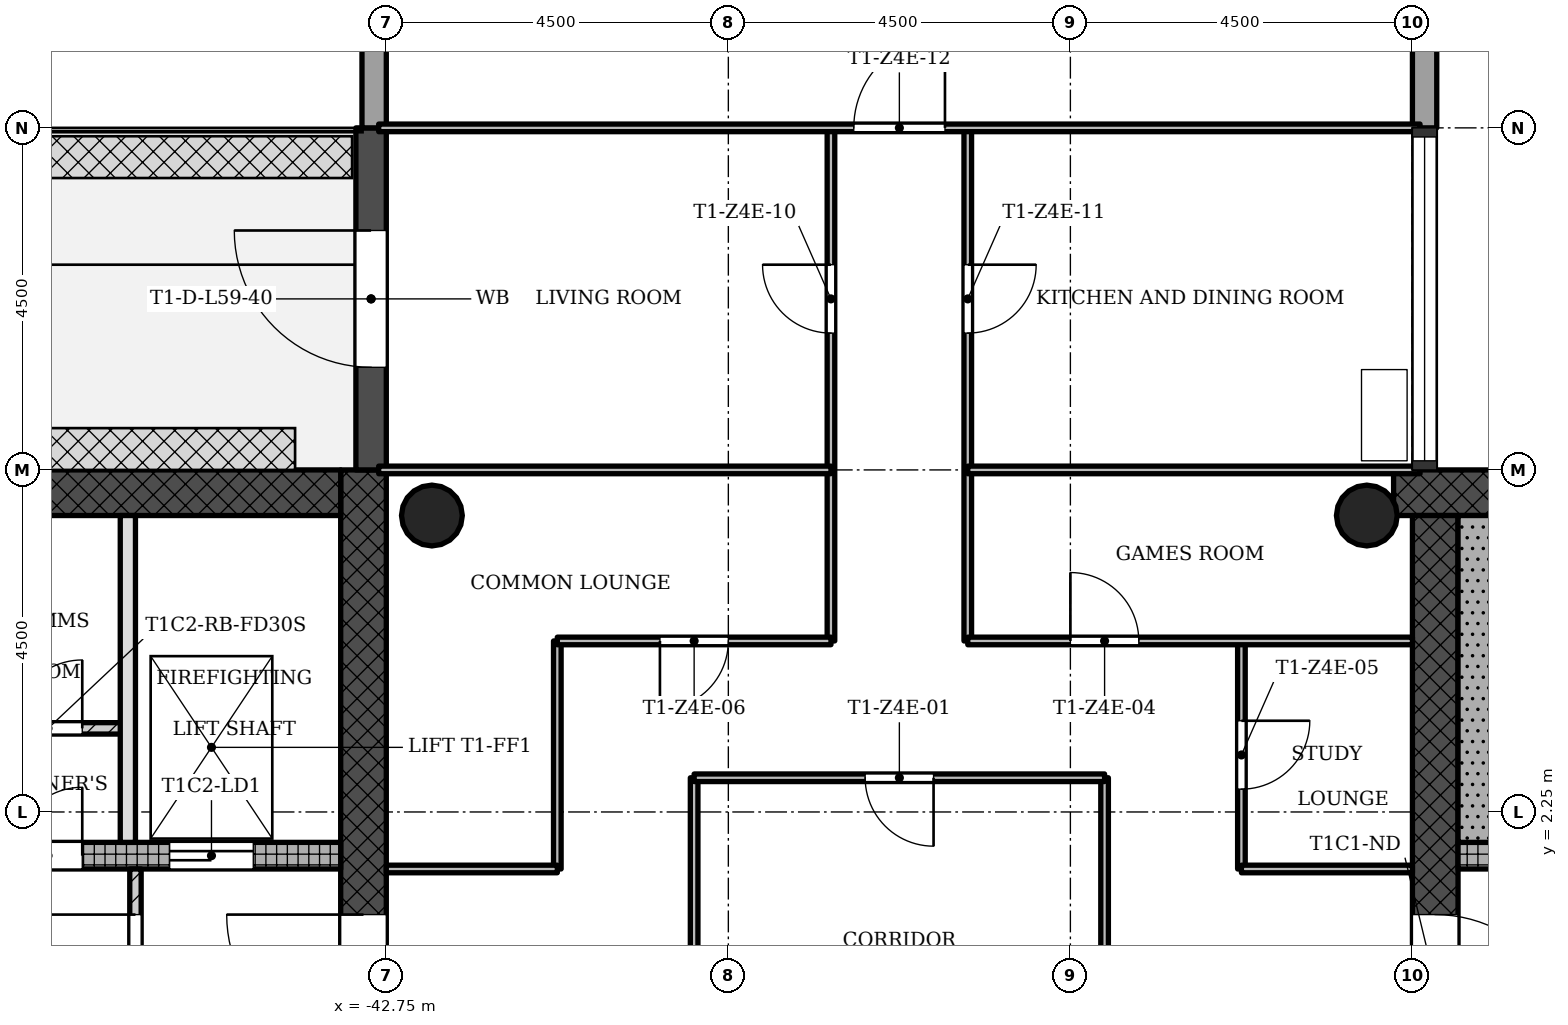
"""IFC4 building model, lengths in metres.
Left out: names, types, materials, properties, quantities, classifications, styles, units other than length and angle.
Written with IfcOpenShell. Run it as: python <this file> out.ifc"""

import sys

from ifc_helpers import new_model, si_unit, direction, frame, frame_2d, origin, origin_2d, place, context, subcontext, project, spatial, rectangle, hollow_circle, extrude, element, fill, save


model = new_model("IFC4")
c1 = context("Model", 3, precision=1e-05, world=origin(), true_north=direction((0.0, 1.0)))
c2 = subcontext(c1, "Body", "Model", "MODEL_VIEW")
j1 = project(units=[si_unit("LENGTHUNIT", "METRE"), si_unit("PLANEANGLEUNIT", "RADIAN")], contexts=[c1])
p1 = place(None, origin())
s1 = spatial("IfcSite", under=j1, at=p1, CompositionType="ELEMENT")
p2 = place(p1, origin())
s2 = spatial("IfcBuilding", under=s1, at=p2, CompositionType="ELEMENT")
p3 = place(p2, frame((0.0, 0.0, 213.0)))
s3 = spatial("IfcBuildingStorey", under=s2, at=p3, CompositionType="ELEMENT", Elevation=213.0)
p4 = place(p3, frame((-20.602, 6.45, 0.0), z_axis=(0.0, 0.0, 1.0), x_axis=(-1.0, 0.0, 0.0)))
e1 = element("IfcWall", 1, at=p4, inside=s3, PredefinedType="SHEAR", context=c2, shape_type="SweptSolid", body=[
    extrude(rectangle(XDim=8.896, YDim=0.6, at=frame_2d((4.448, 0.0))), origin(), (0.0, 0.0, 1.0), 3.4),
])
p5 = place(p3, frame((-28.95, 6.15, 0.0), z_axis=(0.0, 0.0, 1.0), x_axis=(0.0, -1.0, 0.0)))
e2 = element("IfcWall", 2, at=p5, inside=s3, PredefinedType="SHEAR", context=c2, shape_type="SweptSolid", body=[
    extrude(rectangle(XDim=12.9, YDim=0.6, at=frame_2d((6.45, 0.0))), origin(), (0.0, 0.0, 1.0), 3.4),
])
p6 = place(p5, frame((5.25, 0.0, 0.0)))
e3 = element("IfcOpeningElement", 3, at=p6, cuts=e2, PredefinedType="OPENING", context=c2, shape_type="SweptSolid", body=[
    extrude(rectangle(XDim=1.8, YDim=2.1, at=frame_2d((0.9, 1.05))), frame((0.0, 0.31, 0.0), z_axis=(0.0, -1.0, 0.0), x_axis=(1.0, 0.0, 0.0)), (0.0, 0.0, 1.0), 0.62),
])
p7 = place(p3, frame((-28.65, 1.675, 0.0), z_axis=(0.0, 0.0, 1.0), x_axis=(1.0, 0.0, 0.0)))
e4 = element("IfcWall", 4, at=p7, inside=s3, PredefinedType="SHEAR", context=c2, shape_type="SweptSolid", body=[
    extrude(rectangle(XDim=7.8, YDim=0.35, at=frame_2d((3.9, 0.0))), origin(), (0.0, 0.0, 1.0), 3.4),
])
p8 = place(p7, frame((1.05, 0.0, 0.0)))
e5 = element("IfcOpeningElement", 5, at=p8, cuts=e4, PredefinedType="OPENING", context=c2, shape_type="SweptSolid", body=[
    extrude(rectangle(XDim=0.9, YDim=2.1, at=frame_2d((0.45, 1.05))), frame((0.0, 0.185, 0.0), z_axis=(0.0, -1.0, 0.0), x_axis=(1.0, 0.0, 0.0)), (0.0, 0.0, 1.0), 0.37),
])
p9 = place(p3, frame((-43.05, -6.15, 0.0), z_axis=(0.0, 0.0, 1.0), x_axis=(0.0, 1.0, 0.0)))
e6 = element("IfcWall", 6, at=p9, inside=s3, PredefinedType="SHEAR", context=c2, shape_type="SweptSolid", body=[
    extrude(rectangle(XDim=12.9, YDim=0.6, at=frame_2d((6.45, 0.0))), origin(), (0.0, 0.0, 1.0), 3.4),
])
p10 = place(p9, frame((5.25, 0.0, 0.0)))
e7 = element("IfcOpeningElement", 7, at=p10, cuts=e6, PredefinedType="OPENING", context=c2, shape_type="SweptSolid", body=[
    extrude(rectangle(XDim=1.8, YDim=2.1, at=frame_2d((0.9, 1.05))), frame((0.0, 0.31, 0.0), z_axis=(0.0, -1.0, 0.0), x_axis=(1.0, 0.0, 0.0)), (0.0, 0.0, 1.0), 0.62),
])
p11 = place(p3, frame((-43.35, 6.45, 0.0), z_axis=(0.0, 0.0, 1.0), x_axis=(-1.0, 0.0, 0.0)))
e8 = element("IfcWall", 8, at=p11, inside=s3, PredefinedType="SHEAR", context=c2, shape_type="SweptSolid", body=[
    extrude(rectangle(XDim=8.4, YDim=0.6, at=frame_2d((4.2, 0.0))), origin(), (0.0, 0.0, 1.0), 3.4),
])
p12 = place(p3, frame((-51.15, 1.675, 0.0), z_axis=(0.0, 0.0, 1.0), x_axis=(1.0, 0.0, 0.0)))
e9 = element("IfcWall", 9, at=p12, inside=s3, PredefinedType="SHEAR", context=c2, shape_type="SweptSolid", body=[
    extrude(rectangle(XDim=7.8, YDim=0.35, at=frame_2d((3.9, 0.0))), origin(), (0.0, 0.0, 1.0), 3.4),
])
p13 = place(p12, frame((5.55, 0.0, 0.0)))
e10 = element("IfcOpeningElement", 10, at=p13, cuts=e9, PredefinedType="OPENING", context=c2, shape_type="SweptSolid", body=[
    extrude(rectangle(XDim=1.1, YDim=2.1, at=frame_2d((0.55, 1.05))), frame((0.0, 0.185, 0.0), z_axis=(0.0, -1.0, 0.0), x_axis=(1.0, 0.0, 0.0)), (0.0, 0.0, 1.0), 0.37),
])
p14 = place(p12, frame((1.2, 0.0, 0.0)))
e11 = element("IfcOpeningElement", 11, at=p14, cuts=e9, PredefinedType="OPENING", context=c2, shape_type="SweptSolid", body=[
    extrude(rectangle(XDim=1.1, YDim=2.1, at=frame_2d((0.55, 1.05))), frame((0.0, 0.185, 0.0), z_axis=(0.0, -1.0, 0.0), x_axis=(1.0, 0.0, 0.0)), (0.0, 0.0, 1.0), 0.37),
])
p15 = place(p12, frame((3.5, 0.0, 0.0)))
e12 = element("IfcOpeningElement", 12, at=p15, cuts=e9, PredefinedType="OPENING", context=c2, shape_type="SweptSolid", body=[
    extrude(rectangle(XDim=0.9, YDim=2.1, at=frame_2d((0.45, 1.05))), frame((0.0, 0.185, 0.0), z_axis=(0.0, -1.0, 0.0), x_axis=(1.0, 0.0, 0.0)), (0.0, 0.0, 1.0), 0.37),
])
for number, where, z_axis, x_axis in (
    (13, (-29.85, 6.15, 0.0), (0.0, 0.0, 1.0), (1.0, 0.0, 0.0)),
    (14, (-42.15, 6.15, 0.0), (0.0, 0.0, 1.0), (1.0, 0.0, 0.0)),
):
    element("IfcColumn", number, at=place(p3, frame(where, z_axis=z_axis, x_axis=x_axis)), inside=s3, PredefinedType="COLUMN", context=c2, shape_type="SweptSolid", body=[
        extrude(hollow_circle(Radius=0.4, WallThickness=0.028, at=origin_2d()), origin(), (0.0, 0.0, 1.0), 3.4),
    ])
p16 = place(p3, frame((-29.09, 11.25, -0.3), z_axis=(0.0, 0.0, 1.0), x_axis=(0.0, 1.0, 0.0)))
e15 = element("IfcWall", 15, at=p16, inside=s3, PredefinedType="STANDARD", context=c2, shape_type="SweptSolid", body=[
    extrude(rectangle(XDim=1.82, YDim=0.32, at=frame_2d((0.91, 0.0))), origin(), (0.0, 0.0, 1.0), 3.4),
])
p17 = place(p3, frame((-42.91, 12.75, -0.3), z_axis=(0.0, 0.0, 1.0), x_axis=(0.0, -1.0, 0.0)))
e16 = element("IfcWall", 16, at=p17, inside=s3, PredefinedType="STANDARD", context=c2, shape_type="SweptSolid", body=[
    extrude(rectangle(XDim=1.5, YDim=0.32, at=frame_2d((0.75, 0.0))), origin(), (0.0, 0.0, 1.0), 3.4),
])
p18 = place(p3, frame((-42.95, 11.25, -0.02), z_axis=(0.0, 0.0, 1.0), x_axis=(0.0, -1.0, 0.0)))
e17 = element("IfcWall", 17, at=p18, inside=s3, PredefinedType="STANDARD", context=c2, shape_type="SweptSolid", body=[
    extrude(rectangle(XDim=4.5, YDim=0.4, at=frame_2d((2.25, 0.0))), origin(), (0.0, 0.0, 1.0), 3.12),
])
p19 = place(p18, frame((1.35, 0.0, 0.02)))
e18 = element("IfcOpeningElement", 18, at=p19, cuts=e17, PredefinedType="OPENING", context=c2, shape_type="SweptSolid", body=[
    extrude(rectangle(XDim=1.8, YDim=2.1, at=frame_2d((0.9, 1.05))), frame((0.0, 0.21, 0.0), z_axis=(0.0, -1.0, 0.0), x_axis=(1.0, 0.0, 0.0)), (0.0, 0.0, 1.0), 0.42),
])
p20 = place(p3, frame((-46.05, 1.5, 0.0), z_axis=(0.0, 0.0, 1.0), x_axis=(0.0, -1.0, 0.0)))
e19 = element("IfcWall", 19, at=p20, inside=s3, PredefinedType="PARTITIONING", context=c2, shape_type="SweptSolid", body=[
    extrude(rectangle(XDim=3.0, YDim=0.15, at=frame_2d((1.5, 0.0))), origin(), (0.0, 0.0, 1.0), 3.0),
])
p21 = place(p20, frame((0.6, 0.0, 0.0)))
e20 = element("IfcOpeningElement", 20, at=p21, cuts=e19, PredefinedType="OPENING", context=c2, shape_type="SweptSolid", body=[
    extrude(rectangle(XDim=1.8, YDim=2.1, at=frame_2d((0.9, 1.05))), frame((0.0, 0.085, 0.0), z_axis=(0.0, -1.0, 0.0), x_axis=(1.0, 0.0, 0.0)), (0.0, 0.0, 1.0), 0.17),
])
p22 = place(p3, frame((-46.15, 6.15, 0.0), z_axis=(0.0, 0.0, 1.0), x_axis=(0.0, -1.0, 0.0)))
e21 = element("IfcWall", 21, at=p22, inside=s3, PredefinedType="SOLIDWALL", context=c2, shape_type="SweptSolid", body=[
    extrude(rectangle(XDim=4.3, YDim=0.2, at=frame_2d((2.15, 0.0))), origin(), (0.0, 0.0, 1.0), 3.0),
])
p23 = place(p3, frame((-46.15, 3.35, 0.0), z_axis=(0.0, 0.0, 1.0), x_axis=(-1.0, 0.0, 0.0)))
e22 = element("IfcWall", 22, at=p23, inside=s3, PredefinedType="PARTITIONING", context=c2, shape_type="SweptSolid", body=[
    extrude(rectangle(XDim=2.1, YDim=0.15, at=frame_2d((1.05, 0.0))), origin(), (0.0, 0.0, 1.0), 3.0),
])
p24 = place(p23, frame((0.6, 0.0, 0.0)))
e23 = element("IfcOpeningElement", 23, at=p24, cuts=e22, PredefinedType="OPENING", context=c2, shape_type="SweptSolid", body=[
    extrude(rectangle(XDim=0.9, YDim=2.1, at=frame_2d((0.45, 1.05))), frame((0.0, 0.085, 0.0), z_axis=(0.0, -1.0, 0.0), x_axis=(1.0, 0.0, 0.0)), (0.0, 0.0, 1.0), 0.17),
])
p25 = place(p3, frame((-40.5, 1.5, 0.0), z_axis=(0.0, 0.0, 1.0), x_axis=(0.0, 1.0, 0.0)))
e24 = element("IfcWall", 24, at=p25, inside=s3, PredefinedType="PARTITIONING", context=c2, shape_type="SweptSolid", body=[
    extrude(rectangle(XDim=3.0, YDim=0.1, at=frame_2d((1.5, 0.0))), origin(), (0.0, 0.0, 1.0), 3.0),
])
p26 = place(p3, frame((-38.7, -2.7, 0.0), z_axis=(0.0, 0.0, 1.0), x_axis=(0.0, 1.0, 0.0)))
e25 = element("IfcWall", 25, at=p26, inside=s3, PredefinedType="PARTITIONING", context=c2, shape_type="SweptSolid", body=[
    extrude(rectangle(XDim=5.4, YDim=0.1, at=frame_2d((2.7, 0.0))), origin(), (0.0, 0.0, 1.0), 3.0),
])
p27 = place(p3, frame((-36.9, 4.5, 0.0), z_axis=(0.0, 0.0, 1.0), x_axis=(0.0, 1.0, 0.0)))
e26 = element("IfcWall", 26, at=p27, inside=s3, PredefinedType="PARTITIONING", context=c2, shape_type="SweptSolid", body=[
    extrude(rectangle(XDim=6.75, YDim=0.1, at=frame_2d((3.375, 0.0))), origin(), (0.0, 0.0, 1.0), 3.0),
])
p28 = place(p27, frame((4.05, 0.0, 0.0)))
e27 = element("IfcOpeningElement", 27, at=p28, cuts=e26, PredefinedType="OPENING", context=c2, shape_type="SweptSolid", body=[
    extrude(rectangle(XDim=0.9, YDim=2.1, at=frame_2d((0.45, 1.05))), frame((0.0, 0.06, 0.0), z_axis=(0.0, -1.0, 0.0), x_axis=(1.0, 0.0, 0.0)), (0.0, 0.0, 1.0), 0.12),
])
p29 = place(p3, frame((-35.1, 4.5, 0.0), z_axis=(0.0, 0.0, 1.0), x_axis=(0.0, 1.0, 0.0)))
e28 = element("IfcWall", 28, at=p29, inside=s3, PredefinedType="PARTITIONING", context=c2, shape_type="SweptSolid", body=[
    extrude(rectangle(XDim=6.75, YDim=0.1, at=frame_2d((3.375, 0.0))), origin(), (0.0, 0.0, 1.0), 3.0),
])
p30 = place(p29, frame((4.05, 0.0, 0.0)))
e29 = element("IfcOpeningElement", 29, at=p30, cuts=e28, PredefinedType="OPENING", context=c2, shape_type="SweptSolid", body=[
    extrude(rectangle(XDim=0.9, YDim=2.1, at=frame_2d((0.45, 1.05))), frame((0.0, 0.06, 0.0), z_axis=(0.0, -1.0, 0.0), x_axis=(1.0, 0.0, 0.0)), (0.0, 0.0, 1.0), 0.12),
])
p31 = place(p3, frame((-33.3, -2.7, 0.0), z_axis=(0.0, 0.0, 1.0), x_axis=(0.0, 1.0, 0.0)))
e30 = element("IfcWall", 30, at=p31, inside=s3, PredefinedType="PARTITIONING", context=c2, shape_type="SweptSolid", body=[
    extrude(rectangle(XDim=5.4, YDim=0.1, at=frame_2d((2.7, 0.0))), origin(), (0.0, 0.0, 1.0), 3.0),
])
p32 = place(p31, frame((2.25, 0.0, 0.0)))
e31 = element("IfcOpeningElement", 31, at=p32, cuts=e30, PredefinedType="OPENING", context=c2, shape_type="SweptSolid", body=[
    extrude(rectangle(XDim=0.9, YDim=2.1, at=frame_2d((0.45, 1.05))), frame((0.0, 0.06, 0.0), z_axis=(0.0, -1.0, 0.0), x_axis=(1.0, 0.0, 0.0)), (0.0, 0.0, 1.0), 0.12),
])
p33 = place(p3, frame((-31.5, 1.5, 0.0), z_axis=(0.0, 0.0, 1.0), x_axis=(0.0, 1.0, 0.0)))
e32 = element("IfcWall", 32, at=p33, inside=s3, PredefinedType="PARTITIONING", context=c2, shape_type="SweptSolid", body=[
    extrude(rectangle(XDim=3.0, YDim=0.1, at=frame_2d((1.5, 0.0))), origin(), (0.0, 0.0, 1.0), 3.0),
])
p34 = place(p33, frame((1.05, 0.0, 0.0)))
e33 = element("IfcOpeningElement", 33, at=p34, cuts=e32, PredefinedType="OPENING", context=c2, shape_type="SweptSolid", body=[
    extrude(rectangle(XDim=0.9, YDim=2.1, at=frame_2d((0.45, 1.05))), frame((0.0, 0.06, 0.0), z_axis=(0.0, -1.0, 0.0), x_axis=(1.0, 0.0, 0.0)), (0.0, 0.0, 1.0), 0.12),
])
for number, where, z_axis, x_axis in (
    (34, (-42.75, 1.5, 0.0), (0.0, 0.0, 1.0), (1.0, 0.0, 0.0)),
    (35, (-31.5, 1.5, 0.0), (0.0, 0.0, 1.0), (1.0, 0.0, 0.0)),
):
    element("IfcWall", number, at=place(p3, frame(where, z_axis=z_axis, x_axis=x_axis)), inside=s3, PredefinedType="PARTITIONING", context=c2, shape_type="SweptSolid", body=[
        extrude(rectangle(XDim=2.25, YDim=0.1, at=frame_2d((1.125, 0.0))), origin(), (0.0, 0.0, 1.0), 3.0),
    ])
p35 = place(p3, frame((-38.7, 2.7, 0.0), z_axis=(0.0, 0.0, 1.0), x_axis=(1.0, 0.0, 0.0)))
e36 = element("IfcWall", 36, at=p35, inside=s3, PredefinedType="PARTITIONING", context=c2, shape_type="SweptSolid", body=[
    extrude(rectangle(XDim=5.4, YDim=0.1, at=frame_2d((2.7, 0.0))), origin(), (0.0, 0.0, 1.0), 3.0),
])
p36 = place(p35, frame((2.25, 0.0, 0.0)))
e37 = element("IfcOpeningElement", 37, at=p36, cuts=e36, PredefinedType="OPENING", context=c2, shape_type="SweptSolid", body=[
    extrude(rectangle(XDim=0.9, YDim=2.1, at=frame_2d((0.45, 1.05))), frame((0.0, 0.06, 0.0), z_axis=(0.0, -1.0, 0.0), x_axis=(1.0, 0.0, 0.0)), (0.0, 0.0, 1.0), 0.12),
])
p37 = place(p3, frame((-40.5, 4.5, 0.0), z_axis=(0.0, 0.0, 1.0), x_axis=(1.0, 0.0, 0.0)))
e38 = element("IfcWall", 38, at=p37, inside=s3, PredefinedType="PARTITIONING", context=c2, shape_type="SweptSolid", body=[
    extrude(rectangle(XDim=3.6, YDim=0.1, at=frame_2d((1.8, 0.0))), origin(), (0.0, 0.0, 1.0), 3.0),
])
p38 = place(p37, frame((1.35, 0.0, 0.0)))
e39 = element("IfcOpeningElement", 39, at=p38, cuts=e38, PredefinedType="OPENING", context=c2, shape_type="SweptSolid", body=[
    extrude(rectangle(XDim=0.9, YDim=2.1, at=frame_2d((0.45, 1.05))), frame((0.0, 0.06, 0.0), z_axis=(0.0, -1.0, 0.0), x_axis=(1.0, 0.0, 0.0)), (0.0, 0.0, 1.0), 0.12),
])
p39 = place(p3, frame((-35.1, 4.5, 0.0), z_axis=(0.0, 0.0, 1.0), x_axis=(1.0, 0.0, 0.0)))
e40 = element("IfcWall", 40, at=p39, inside=s3, PredefinedType="PARTITIONING", context=c2, shape_type="SweptSolid", body=[
    extrude(rectangle(XDim=5.85, YDim=0.1, at=frame_2d((2.925, 0.0))), origin(), (0.0, 0.0, 1.0), 3.0),
])
p40 = place(p39, frame((1.35, 0.0, 0.0)))
e41 = element("IfcOpeningElement", 41, at=p40, cuts=e40, PredefinedType="OPENING", context=c2, shape_type="SweptSolid", body=[
    extrude(rectangle(XDim=0.9, YDim=2.1, at=frame_2d((0.45, 1.05))), frame((0.0, 0.06, 0.0), z_axis=(0.0, -1.0, 0.0), x_axis=(1.0, 0.0, 0.0)), (0.0, 0.0, 1.0), 0.12),
])
for number, where, z_axis, x_axis in (
    (42, (-42.85, 6.75, 0.0), (0.0, 0.0, 1.0), (1.0, 0.0, 0.0)),
    (43, (-35.1, 6.75, 0.0), (0.0, 0.0, 1.0), (1.0, 0.0, 0.0)),
):
    element("IfcWall", number, at=place(p3, frame(where, z_axis=z_axis, x_axis=x_axis)), inside=s3, PredefinedType="PARTITIONING", context=c2, shape_type="SweptSolid", body=[
        extrude(rectangle(XDim=5.95, YDim=0.1, at=frame_2d((2.975, 0.0))), origin(), (0.0, 0.0, 1.0), 3.0),
    ])
p41 = place(p3, frame((-42.85, 11.25, 0.0), z_axis=(0.0, 0.0, 1.0), x_axis=(1.0, 0.0, 0.0)))
e44 = element("IfcWall", 44, at=p41, inside=s3, PredefinedType="PARTITIONING", context=c2, shape_type="SweptSolid", body=[
    extrude(rectangle(XDim=13.7, YDim=0.1, at=frame_2d((6.85, 0.0))), origin(), (0.0, 0.0, 1.0), 3.0),
])
p42 = place(p41, frame((6.25, 0.0, 0.0)))
e45 = element("IfcOpeningElement", 45, at=p42, cuts=e44, PredefinedType="OPENING", context=c2, shape_type="SweptSolid", body=[
    extrude(rectangle(XDim=1.2, YDim=2.1, at=frame_2d((0.6, 1.05))), frame((0.0, 0.06, 0.0), z_axis=(0.0, -1.0, 0.0), x_axis=(1.0, 0.0, 0.0)), (0.0, 0.0, 1.0), 0.12),
])
p43 = place(p3, frame((-28.35, 1.85, 0.0), z_axis=(0.0, 0.0, 1.0), x_axis=(0.0, 1.0, 0.0)))
e46 = element("IfcWall", 46, at=p43, inside=s3, PredefinedType="SHEAR", context=c2, shape_type="SweptSolid", body=[
    extrude(rectangle(XDim=4.3, YDim=0.6, at=frame_2d((2.15, 0.0))), origin(), (0.0, 0.0, 1.0), 3.4),
])
p44 = place(p19, origin())
e47 = element("IfcDoor", 47, at=p44, inside=s3, OperationType="SINGLE_SWING_LEFT", PredefinedType="DOOR", context=c2, shape_type="SweptSolid", body=[
    extrude(rectangle(XDim=1.8, YDim=2.1, at=frame_2d((0.9, 1.05))), frame((0.0, 0.025, 0.0), z_axis=(0.0, -1.0, 0.0), x_axis=(1.0, 0.0, 0.0)), (0.0, 0.0, 1.0), 0.05),
])
fill(e18, e47)
p45 = place(p21, origin())
e48 = element("IfcDoor", 48, at=p45, inside=s3, OperationType="SINGLE_SWING_LEFT", PredefinedType="DOOR", context=c2, shape_type="SweptSolid", body=[
    extrude(rectangle(XDim=1.8, YDim=2.1, at=frame_2d((0.9, 1.05))), frame((0.0, 0.025, 0.0), z_axis=(0.0, -1.0, 0.0), x_axis=(1.0, 0.0, 0.0)), (0.0, 0.0, 1.0), 0.05),
])
fill(e20, e48)
p46 = place(p24, origin())
e49 = element("IfcDoor", 49, at=p46, inside=s3, OperationType="SINGLE_SWING_LEFT", PredefinedType="DOOR", context=c2, shape_type="SweptSolid", body=[
    extrude(rectangle(XDim=0.9, YDim=2.1, at=frame_2d((0.45, 1.05))), frame((0.0, 0.025, 0.0), z_axis=(0.0, -1.0, 0.0), x_axis=(1.0, 0.0, 0.0)), (0.0, 0.0, 1.0), 0.05),
])
fill(e23, e49)
p47 = place(p36, origin())
e50 = element("IfcDoor", 50, at=p47, inside=s3, OperationType="SINGLE_SWING_RIGHT", PredefinedType="DOOR", context=c2, shape_type="SweptSolid", body=[
    extrude(rectangle(XDim=0.9, YDim=2.1, at=frame_2d((0.45, 1.05))), frame((0.0, 0.025, 0.0), z_axis=(0.0, -1.0, 0.0), x_axis=(1.0, 0.0, 0.0)), (0.0, 0.0, 1.0), 0.05),
])
fill(e37, e50)
p48 = place(p40, origin())
e51 = element("IfcDoor", 51, at=p48, inside=s3, OperationType="SINGLE_SWING_RIGHT", PredefinedType="DOOR", context=c2, shape_type="SweptSolid", body=[
    extrude(rectangle(XDim=0.9, YDim=2.1, at=frame_2d((0.45, 1.05))), frame((0.0, 0.025, 0.0), z_axis=(0.0, -1.0, 0.0), x_axis=(1.0, 0.0, 0.0)), (0.0, 0.0, 1.0), 0.05),
])
fill(e41, e51)
p49 = place(p34, origin())
e52 = element("IfcDoor", 52, at=p49, inside=s3, OperationType="SINGLE_SWING_RIGHT", PredefinedType="DOOR", context=c2, shape_type="SweptSolid", body=[
    extrude(rectangle(XDim=0.9, YDim=2.1, at=frame_2d((0.45, 1.05))), frame((0.0, 0.025, 0.0), z_axis=(0.0, -1.0, 0.0), x_axis=(1.0, 0.0, 0.0)), (0.0, 0.0, 1.0), 0.05),
])
fill(e33, e52)
p50 = place(p38, origin())
e53 = element("IfcDoor", 53, at=p50, inside=s3, OperationType="SINGLE_SWING_LEFT", PredefinedType="DOOR", context=c2, shape_type="SweptSolid", body=[
    extrude(rectangle(XDim=0.9, YDim=2.1, at=frame_2d((0.45, 1.05))), frame((0.0, 0.025, 0.0), z_axis=(0.0, -1.0, 0.0), x_axis=(1.0, 0.0, 0.0)), (0.0, 0.0, 1.0), 0.05),
])
fill(e39, e53)
p51 = place(p28, origin())
e54 = element("IfcDoor", 54, at=p51, inside=s3, OperationType="SINGLE_SWING_LEFT", PredefinedType="DOOR", context=c2, shape_type="SweptSolid", body=[
    extrude(rectangle(XDim=0.9, YDim=2.1, at=frame_2d((0.45, 1.05))), frame((0.0, 0.025, 0.0), z_axis=(0.0, -1.0, 0.0), x_axis=(1.0, 0.0, 0.0)), (0.0, 0.0, 1.0), 0.05),
])
fill(e27, e54)
p52 = place(p30, origin())
e55 = element("IfcDoor", 55, at=p52, inside=s3, OperationType="SINGLE_SWING_RIGHT", PredefinedType="DOOR", context=c2, shape_type="SweptSolid", body=[
    extrude(rectangle(XDim=0.9, YDim=2.1, at=frame_2d((0.45, 1.05))), frame((0.0, 0.025, 0.0), z_axis=(0.0, -1.0, 0.0), x_axis=(1.0, 0.0, 0.0)), (0.0, 0.0, 1.0), 0.05),
])
fill(e29, e55)
p53 = place(p42, origin())
e56 = element("IfcDoor", 56, at=p53, inside=s3, OperationType="SINGLE_SWING_LEFT", PredefinedType="DOOR", context=c2, shape_type="SweptSolid", body=[
    extrude(rectangle(XDim=1.2, YDim=2.1, at=frame_2d((0.6, 1.05))), frame((0.0, 0.025, 0.0), z_axis=(0.0, -1.0, 0.0), x_axis=(1.0, 0.0, 0.0)), (0.0, 0.0, 1.0), 0.05),
])
fill(e45, e56)
p54 = place(p6, origin())
e57 = element("IfcDoor", 57, at=p54, inside=s3, OperationType="SINGLE_SWING_LEFT", PredefinedType="DOOR", context=c2, shape_type="SweptSolid", body=[
    extrude(rectangle(XDim=1.8, YDim=2.1, at=frame_2d((0.9, 1.05))), frame((0.0, 0.025, 0.0), z_axis=(0.0, -1.0, 0.0), x_axis=(1.0, 0.0, 0.0)), (0.0, 0.0, 1.0), 0.05),
])
fill(e3, e57)
p55 = place(p13, origin())
e58 = element("IfcDoor", 58, at=p55, inside=s3, OperationType="SLIDING_TO_LEFT", PredefinedType="DOOR", context=c2, shape_type="SweptSolid", body=[
    extrude(rectangle(XDim=1.1, YDim=2.1, at=frame_2d((0.55, 1.05))), frame((0.0, 0.025, 0.0), z_axis=(0.0, -1.0, 0.0), x_axis=(1.0, 0.0, 0.0)), (0.0, 0.0, 1.0), 0.05),
])
fill(e10, e58)
p56 = place(p15, origin())
e59 = element("IfcDoor", 59, at=p56, inside=s3, OperationType="SINGLE_SWING_LEFT", PredefinedType="DOOR", context=c2, shape_type="SweptSolid", body=[
    extrude(rectangle(XDim=0.9, YDim=2.1, at=frame_2d((0.45, 1.05))), frame((0.0, 0.025, 0.0), z_axis=(0.0, -1.0, 0.0), x_axis=(1.0, 0.0, 0.0)), (0.0, 0.0, 1.0), 0.05),
])
fill(e12, e59)
p57 = place(p10, origin())
e60 = element("IfcDoor", 60, at=p57, inside=s3, OperationType="SINGLE_SWING_LEFT", PredefinedType="DOOR", context=c2, shape_type="SweptSolid", body=[
    extrude(rectangle(XDim=1.8, YDim=2.1, at=frame_2d((0.9, 1.05))), frame((0.0, 0.025, 0.0), z_axis=(0.0, -1.0, 0.0), x_axis=(1.0, 0.0, 0.0)), (0.0, 0.0, 1.0), 0.05),
])
fill(e7, e60)
save(model, sys.argv[1])
